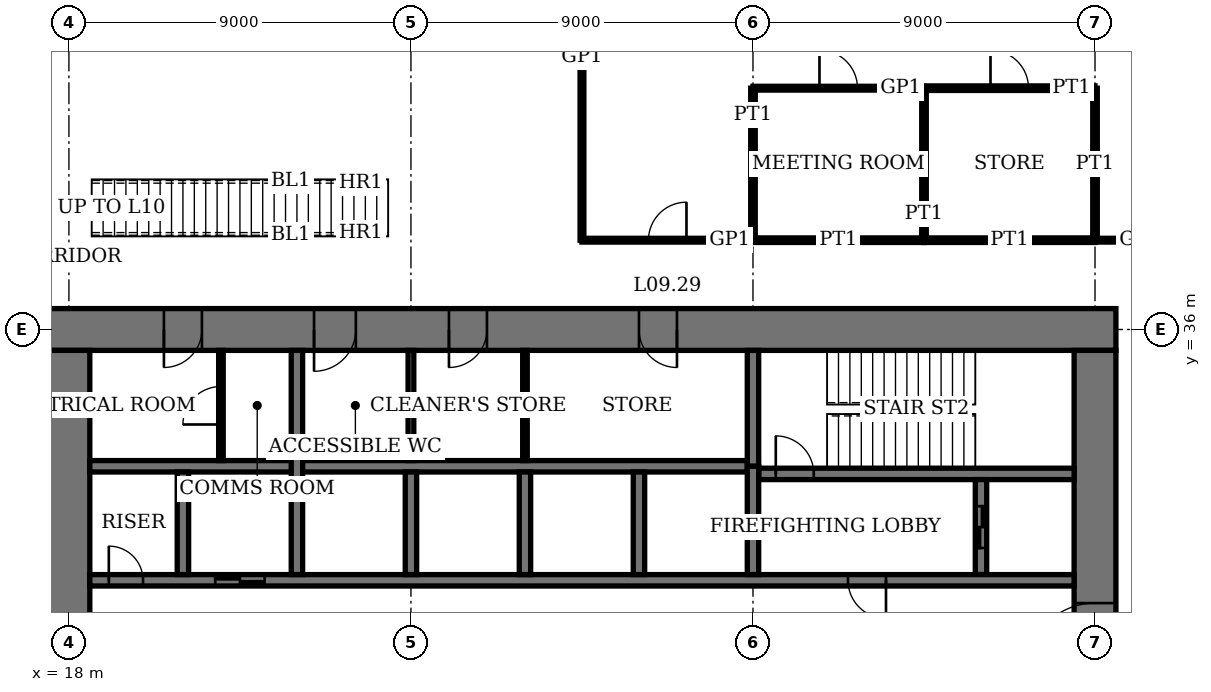
"""IFC4 building model, lengths in metres.
Left out: names, types, materials, properties, quantities, classifications, styles, units other than length and angle.
Written with IfcOpenShell. Run it as: python <this file> out.ifc"""

import sys

from ifc_helpers import new_model, si_unit, direction, frame, frame_2d, origin, place, context, subcontext, project, spatial, rectangle, extrude, element, fill, save


model = new_model("IFC4")
c1 = context("Model", 3, precision=1e-05, world=origin(), true_north=direction((0.0, 1.0)))
c2 = subcontext(c1, "Body", "Model", "MODEL_VIEW")
j1 = project(units=[si_unit("LENGTHUNIT", "METRE"), si_unit("PLANEANGLEUNIT", "RADIAN")], contexts=[c1])
p1 = place(None, origin())
s1 = spatial("IfcSite", under=j1, at=p1, CompositionType="ELEMENT")
p2 = place(p1, origin())
s2 = spatial("IfcBuilding", under=s1, at=p2, CompositionType="ELEMENT")
p3 = place(p2, frame((0.0, 0.0, 39.8)))
s3 = spatial("IfcBuildingStorey", under=s2, at=p3, CompositionType="ELEMENT", Elevation=39.8)
p4 = place(p3, frame((45.55, 36.0, 0.0), z_axis=(0.0, 0.0, 1.0), x_axis=(-1.0, 0.0, 0.0)))
e1 = element("IfcWall", 1, at=p4, inside=s3, PredefinedType="SHEAR", context=c2, shape_type="SweptSolid", body=[
    extrude(rectangle(XDim=28.1, YDim=1.1, at=frame_2d((14.05, 0.0))), origin(), (0.0, 0.0, 1.0), 4.0),
])
p5 = place(p4, frame((11.55, 0.0, 0.0)))
e2 = element("IfcOpeningElement", 2, at=p5, cuts=e1, PredefinedType="OPENING", context=c2, shape_type="SweptSolid", body=[
    extrude(rectangle(XDim=1.0, YDim=2.4, at=frame_2d((0.5, 1.2))), frame((0.0, 0.56, 0.0), z_axis=(0.0, -1.0, 0.0), x_axis=(1.0, 0.0, 0.0)), (0.0, 0.0, 1.0), 1.12),
])
p6 = place(p4, frame((16.55, 0.0, 0.0)))
e3 = element("IfcOpeningElement", 3, at=p6, cuts=e1, PredefinedType="OPENING", context=c2, shape_type="SweptSolid", body=[
    extrude(rectangle(XDim=1.0, YDim=2.4, at=frame_2d((0.5, 1.2))), frame((0.0, 0.56, 0.0), z_axis=(0.0, -1.0, 0.0), x_axis=(1.0, 0.0, 0.0)), (0.0, 0.0, 1.0), 1.12),
])
p7 = place(p4, frame((20.0, 0.0, 0.0)))
e4 = element("IfcOpeningElement", 4, at=p7, cuts=e1, PredefinedType="OPENING", context=c2, shape_type="SweptSolid", body=[
    extrude(rectangle(XDim=1.1, YDim=2.4, at=frame_2d((0.55, 1.2))), frame((0.0, 0.56, 0.0), z_axis=(0.0, -1.0, 0.0), x_axis=(1.0, 0.0, 0.0)), (0.0, 0.0, 1.0), 1.12),
])
p8 = place(p4, frame((24.05, 0.0, 0.0)))
e5 = element("IfcOpeningElement", 5, at=p8, cuts=e1, PredefinedType="OPENING", context=c2, shape_type="SweptSolid", body=[
    extrude(rectangle(XDim=1.0, YDim=2.4, at=frame_2d((0.5, 1.2))), frame((0.0, 0.56, 0.0), z_axis=(0.0, -1.0, 0.0), x_axis=(1.0, 0.0, 0.0)), (0.0, 0.0, 1.0), 1.12),
])
p9 = place(p3, frame((18.0, 35.45, 0.0), z_axis=(0.0, 0.0, 1.0), x_axis=(0.0, -1.0, 0.0)))
e6 = element("IfcWall", 6, at=p9, inside=s3, PredefinedType="SHEAR", context=c2, shape_type="SweptSolid", body=[
    extrude(rectangle(XDim=16.9, YDim=1.1, at=frame_2d((8.45, 0.0))), origin(), (0.0, 0.0, 1.0), 4.0),
])
p10 = place(p9, frame((8.45, 0.0, 0.0)))
e7 = element("IfcOpeningElement", 7, at=p10, cuts=e6, PredefinedType="OPENING", context=c2, shape_type="SweptSolid", body=[
    extrude(rectangle(XDim=1.8, YDim=2.4, at=frame_2d((0.9, 1.2))), frame((0.0, 0.56, 0.0), z_axis=(0.0, -1.0, 0.0), x_axis=(1.0, 0.0, 0.0)), (0.0, 0.0, 1.0), 1.12),
])
p11 = place(p3, frame((45.0, 18.55, 0.0), z_axis=(0.0, 0.0, 1.0), x_axis=(0.0, 1.0, 0.0)))
e8 = element("IfcWall", 8, at=p11, inside=s3, PredefinedType="SHEAR", context=c2, shape_type="SweptSolid", body=[
    extrude(rectangle(XDim=16.9, YDim=1.1, at=frame_2d((8.45, 0.0))), origin(), (0.0, 0.0, 1.0), 4.0),
])
p12 = place(p11, frame((8.45, 0.0, 0.0)))
e9 = element("IfcOpeningElement", 9, at=p12, cuts=e8, PredefinedType="OPENING", context=c2, shape_type="SweptSolid", body=[
    extrude(rectangle(XDim=1.8, YDim=2.4, at=frame_2d((0.9, 1.2))), frame((0.0, 0.56, 0.0), z_axis=(0.0, -1.0, 0.0), x_axis=(1.0, 0.0, 0.0)), (0.0, 0.0, 1.0), 1.12),
])
p13 = place(p3, frame((36.15, 32.2, 0.0), z_axis=(0.0, 0.0, 1.0), x_axis=(1.0, 0.0, 0.0)))
e10 = element("IfcWall", 10, at=p13, inside=s3, PredefinedType="SHEAR", context=c2, shape_type="SweptSolid", body=[
    extrude(rectangle(XDim=8.3, YDim=0.3, at=frame_2d((4.15, 0.0))), origin(), (0.0, 0.0, 1.0), 4.0),
])
p14 = place(p13, frame((0.45, 0.0, 0.0)))
e11 = element("IfcOpeningElement", 11, at=p14, cuts=e10, PredefinedType="OPENING", context=c2, shape_type="SweptSolid", body=[
    extrude(rectangle(XDim=1.0, YDim=2.4, at=frame_2d((0.5, 1.2))), frame((0.0, 0.16, 0.0), z_axis=(0.0, -1.0, 0.0), x_axis=(1.0, 0.0, 0.0)), (0.0, 0.0, 1.0), 0.32),
])
p15 = place(p3, frame((36.0, 32.4, 0.0), z_axis=(0.0, 0.0, 1.0), x_axis=(0.0, 1.0, 0.0)))
e12 = element("IfcWall", 12, at=p15, inside=s3, PredefinedType="SHEAR", context=c2, shape_type="SweptSolid", body=[
    extrude(rectangle(XDim=3.05, YDim=0.3, at=frame_2d((1.525, 0.0))), origin(), (0.0, 0.0, 1.0), 4.0),
])
p16 = place(p3, frame((42.0, 29.55, 0.0), z_axis=(0.0, 0.0, 1.0), x_axis=(0.0, 1.0, 0.0)))
e13 = element("IfcWall", 13, at=p16, inside=s3, PredefinedType="SHEAR", context=c2, shape_type="SweptSolid", body=[
    extrude(rectangle(XDim=2.5, YDim=0.3, at=frame_2d((1.25, 0.0))), origin(), (0.0, 0.0, 1.0), 4.0),
])
p17 = place(p16, frame((0.7, 0.0, 0.0)))
e14 = element("IfcOpeningElement", 14, at=p17, cuts=e13, PredefinedType="OPENING", context=c2, shape_type="SweptSolid", body=[
    extrude(rectangle(XDim=1.1, YDim=2.4, at=frame_2d((0.55, 1.2))), frame((0.0, 0.16, 0.0), z_axis=(0.0, -1.0, 0.0), x_axis=(1.0, 0.0, 0.0)), (0.0, 0.0, 1.0), 0.32),
])
p18 = place(p3, frame((18.55, 29.4, 0.0), z_axis=(0.0, 0.0, 1.0), x_axis=(1.0, 0.0, 0.0)))
e15 = element("IfcWall", 15, at=p18, inside=s3, PredefinedType="SHEAR", context=c2, shape_type="SweptSolid", body=[
    extrude(rectangle(XDim=25.9, YDim=0.3, at=frame_2d((12.95, 0.0))), origin(), (0.0, 0.0, 1.0), 4.0),
])
p19 = place(p18, frame((19.95, 0.0, 0.0)))
e16 = element("IfcOpeningElement", 16, at=p19, cuts=e15, PredefinedType="OPENING", context=c2, shape_type="SweptSolid", body=[
    extrude(rectangle(XDim=1.0, YDim=2.4, at=frame_2d((0.5, 1.2))), frame((0.0, 0.16, 0.0), z_axis=(0.0, -1.0, 0.0), x_axis=(1.0, 0.0, 0.0)), (0.0, 0.0, 1.0), 0.32),
])
p20 = place(p18, frame((0.5, 0.0, 0.0)))
e17 = element("IfcOpeningElement", 17, at=p20, cuts=e15, PredefinedType="OPENING", context=c2, shape_type="SweptSolid", body=[
    extrude(rectangle(XDim=0.9, YDim=2.1, at=frame_2d((0.45, 1.05))), frame((0.0, 0.16, 0.0), z_axis=(0.0, -1.0, 0.0), x_axis=(1.0, 0.0, 0.0)), (0.0, 0.0, 1.0), 0.32),
])
p21 = place(p18, frame((3.3, 0.0, 0.0)))
e18 = element("IfcOpeningElement", 18, at=p21, cuts=e15, PredefinedType="OPENING", context=c2, shape_type="SweptSolid", body=[
    extrude(rectangle(XDim=1.3, YDim=2.4, at=frame_2d((0.65, 1.2))), frame((0.0, 0.16, 0.0), z_axis=(0.0, -1.0, 0.0), x_axis=(1.0, 0.0, 0.0)), (0.0, 0.0, 1.0), 0.32),
])
p22 = place(p3, frame((18.55, 32.4, 0.0), z_axis=(0.0, 0.0, 1.0), x_axis=(1.0, 0.0, 0.0)))
e19 = element("IfcWall", 19, at=p22, inside=s3, PredefinedType="SHEAR", context=c2, shape_type="SweptSolid", body=[
    extrude(rectangle(XDim=17.3, YDim=0.3, at=frame_2d((8.65, 0.0))), origin(), (0.0, 0.0, 1.0), 4.0),
])
for number, where, z_axis, x_axis in (
    (20, (33.0, 29.55, 0.0), (0.0, 0.0, 1.0), (0.0, 1.0, 0.0)),
    (21, (30.0, 29.55, 0.0), (0.0, 0.0, 1.0), (0.0, 1.0, 0.0)),
    (22, (27.0, 29.55, 0.0), (0.0, 0.0, 1.0), (0.0, 1.0, 0.0)),
):
    element("IfcWall", number, at=place(p3, frame(where, z_axis=z_axis, x_axis=x_axis)), inside=s3, PredefinedType="SHEAR", context=c2, shape_type="SweptSolid", body=[
        extrude(rectangle(XDim=2.7, YDim=0.3, at=frame_2d((1.35, 0.0))), origin(), (0.0, 0.0, 1.0), 4.0),
    ])
p23 = place(p3, frame((24.0, 29.55, 0.0), z_axis=(0.0, 0.0, 1.0), x_axis=(0.0, 1.0, 0.0)))
e23 = element("IfcWall", 23, at=p23, inside=s3, PredefinedType="SHEAR", context=c2, shape_type="SweptSolid", body=[
    extrude(rectangle(XDim=5.9, YDim=0.3, at=frame_2d((2.95, 0.0))), origin(), (0.0, 0.0, 1.0), 4.0),
])
p24 = place(p3, frame((21.0, 29.55, 0.0), z_axis=(0.0, 0.0, 1.0), x_axis=(0.0, 1.0, 0.0)))
e24 = element("IfcWall", 24, at=p24, inside=s3, PredefinedType="SHEAR", context=c2, shape_type="SweptSolid", body=[
    extrude(rectangle(XDim=2.7, YDim=0.3, at=frame_2d((1.35, 0.0))), origin(), (0.0, 0.0, 1.0), 4.0),
])
p25 = place(p3, frame((36.0, 29.55, 0.0), z_axis=(0.0, 0.0, 1.0), x_axis=(0.0, 1.0, 0.0)))
e25 = element("IfcWall", 25, at=p25, inside=s3, PredefinedType="SHEAR", context=c2, shape_type="SweptSolid", body=[
    extrude(rectangle(XDim=2.85, YDim=0.3, at=frame_2d((1.425, 0.0))), origin(), (0.0, 0.0, 1.0), 4.0),
])
for number, where, z_axis, x_axis in (
    (26, (36.0, 38.35, 0.0), (0.0, 0.0, 1.0), (1.0, 0.0, 0.0)),
    (27, (40.5, 38.35, 0.0), (0.0, 0.0, 1.0), (1.0, 0.0, 0.0)),
):
    element("IfcWall", number, at=place(p3, frame(where, z_axis=z_axis, x_axis=x_axis)), inside=s3, PredefinedType="PARTITIONING", context=c2, shape_type="SweptSolid", body=[
        extrude(rectangle(XDim=4.5, YDim=0.12, at=frame_2d((2.25, 0.0))), origin(), (0.0, 0.0, 1.0), 3.75),
    ])
p26 = place(p3, frame((31.5, 38.35, 0.0), z_axis=(0.0, 0.0, 1.0), x_axis=(1.0, 0.0, 0.0)))
e28 = element("IfcWall", 28, at=p26, inside=s3, PredefinedType="PARTITIONING", context=c2, shape_type="SweptSolid", body=[
    extrude(rectangle(XDim=4.5, YDim=0.1, at=frame_2d((2.25, 0.0))), origin(), (0.0, 0.0, 1.0), 3.75),
])
p27 = place(p26, frame((1.75, 0.0, 0.0)))
e29 = element("IfcOpeningElement", 29, at=p27, cuts=e28, PredefinedType="OPENING", context=c2, shape_type="SweptSolid", body=[
    extrude(rectangle(XDim=1.0, YDim=2.4, at=frame_2d((0.5, 1.2))), frame((0.0, 0.06, 0.0), z_axis=(0.0, -1.0, 0.0), x_axis=(1.0, 0.0, 0.0)), (0.0, 0.0, 1.0), 0.12),
])
p28 = place(p3, frame((45.0, 38.35, 0.0), z_axis=(0.0, 0.0, 1.0), x_axis=(1.0, 0.0, 0.0)))
e30 = element("IfcWall", 30, at=p28, inside=s3, PredefinedType="PARTITIONING", context=c2, shape_type="SweptSolid", body=[
    extrude(rectangle(XDim=2.35, YDim=0.1, at=frame_2d((1.175, 0.0))), origin(), (0.0, 0.0, 1.0), 3.75),
])
p29 = place(p3, frame((40.5, 42.35, 0.0), z_axis=(0.0, 0.0, 1.0), x_axis=(1.0, 0.0, 0.0)))
e31 = element("IfcWall", 31, at=p29, inside=s3, PredefinedType="PARTITIONING", context=c2, shape_type="SweptSolid", body=[
    extrude(rectangle(XDim=4.5, YDim=0.12, at=frame_2d((2.25, 0.0))), origin(), (0.0, 0.0, 1.0), 3.75),
])
p30 = place(p29, frame((1.75, 0.0, 0.0)))
e32 = element("IfcOpeningElement", 32, at=p30, cuts=e31, PredefinedType="OPENING", context=c2, shape_type="SweptSolid", body=[
    extrude(rectangle(XDim=1.0, YDim=2.4, at=frame_2d((0.5, 1.2))), frame((0.0, 0.07, 0.0), z_axis=(0.0, -1.0, 0.0), x_axis=(1.0, 0.0, 0.0)), (0.0, 0.0, 1.0), 0.14),
])
p31 = place(p3, frame((36.0, 42.35, 0.0), z_axis=(0.0, 0.0, 1.0), x_axis=(1.0, 0.0, 0.0)))
e33 = element("IfcWall", 33, at=p31, inside=s3, PredefinedType="PARTITIONING", context=c2, shape_type="SweptSolid", body=[
    extrude(rectangle(XDim=4.5, YDim=0.1, at=frame_2d((2.25, 0.0))), origin(), (0.0, 0.0, 1.0), 3.75),
])
p32 = place(p31, frame((1.75, 0.0, 0.0)))
e34 = element("IfcOpeningElement", 34, at=p32, cuts=e33, PredefinedType="OPENING", context=c2, shape_type="SweptSolid", body=[
    extrude(rectangle(XDim=1.0, YDim=2.4, at=frame_2d((0.5, 1.2))), frame((0.0, 0.06, 0.0), z_axis=(0.0, -1.0, 0.0), x_axis=(1.0, 0.0, 0.0)), (0.0, 0.0, 1.0), 0.12),
])
p33 = place(p3, frame((31.5, 38.35, 0.0), z_axis=(0.0, 0.0, 1.0), x_axis=(0.0, 1.0, 0.0)))
e35 = element("IfcWall", 35, at=p33, inside=s3, PredefinedType="PARTITIONING", context=c2, shape_type="SweptSolid", body=[
    extrude(rectangle(XDim=10.26, YDim=0.1, at=frame_2d((5.13, 0.0))), origin(), (0.0, 0.0, 1.0), 3.75),
])
p34 = place(p3, frame((36.0, 38.35, 0.0), z_axis=(0.0, 0.0, 1.0), x_axis=(0.0, 1.0, 0.0)))
e36 = element("IfcWall", 36, at=p34, inside=s3, PredefinedType="PARTITIONING", context=c2, shape_type="SweptSolid", body=[
    extrude(rectangle(XDim=4.0, YDim=0.12, at=frame_2d((2.0, 0.0))), origin(), (0.0, 0.0, 1.0), 3.05),
])
p35 = place(p3, frame((40.5, 38.35, 0.0), z_axis=(0.0, 0.0, 1.0), x_axis=(0.0, 1.0, 0.0)))
e37 = element("IfcWall", 37, at=p35, inside=s3, PredefinedType="PARTITIONING", context=c2, shape_type="SweptSolid", body=[
    extrude(rectangle(XDim=4.0, YDim=0.12, at=frame_2d((2.0, 0.0))), origin(), (0.0, 0.0, 1.0), 3.75),
])
p36 = place(p3, frame((45.0, 38.35, 0.0), z_axis=(0.0, 0.0, 1.0), x_axis=(0.0, 1.0, 0.0)))
e38 = element("IfcWall", 38, at=p36, inside=s3, PredefinedType="PARTITIONING", context=c2, shape_type="SweptSolid", body=[
    extrude(rectangle(XDim=4.0, YDim=0.12, at=frame_2d((2.0, 0.0))), origin(), (0.0, 0.0, 1.0), 3.05),
])
p37 = place(p3, frame((30.0, 32.55, 0.0), z_axis=(0.0, 0.0, 1.0), x_axis=(0.0, 1.0, 0.0)))
e39 = element("IfcWall", 39, at=p37, inside=s3, PredefinedType="PARTITIONING", context=c2, shape_type="SweptSolid", body=[
    extrude(rectangle(XDim=2.9, YDim=0.12, at=frame_2d((1.45, 0.0))), origin(), (0.0, 0.0, 1.0), 3.75),
])
p38 = place(p3, frame((27.0, 32.55, 0.0), z_axis=(0.0, 0.0, 1.0), x_axis=(0.0, 1.0, 0.0)))
e40 = element("IfcWall", 40, at=p38, inside=s3, PredefinedType="PARTITIONING", context=c2, shape_type="SweptSolid", body=[
    extrude(rectangle(XDim=2.9, YDim=0.15, at=frame_2d((1.45, 0.0))), origin(), (0.0, 0.0, 1.0), 3.75),
])
p39 = place(p3, frame((22.0, 32.55, 0.0), z_axis=(0.0, 0.0, 1.0), x_axis=(0.0, 1.0, 0.0)))
e41 = element("IfcWall", 41, at=p39, inside=s3, PredefinedType="PARTITIONING", context=c2, shape_type="SweptSolid", body=[
    extrude(rectangle(XDim=2.9, YDim=0.12, at=frame_2d((1.45, 0.0))), origin(), (0.0, 0.0, 1.0), 3.75),
])
p40 = place(p39, frame((0.95, 0.0, 0.0)))
e42 = element("IfcOpeningElement", 42, at=p40, cuts=e41, PredefinedType="OPENING", context=c2, shape_type="SweptSolid", body=[
    extrude(rectangle(XDim=1.0, YDim=2.4, at=frame_2d((0.5, 1.2))), frame((0.0, 0.07, 0.0), z_axis=(0.0, -1.0, 0.0), x_axis=(1.0, 0.0, 0.0)), (0.0, 0.0, 1.0), 0.14),
])
p41 = place(p12, origin())
e43 = element("IfcDoor", 43, at=p41, inside=s3, OperationType="DOUBLE_DOOR_DOUBLE_SWING", PredefinedType="DOOR", context=c2, shape_type="SweptSolid", body=[
    extrude(rectangle(XDim=1.8, YDim=2.4, at=frame_2d((0.9, 1.2))), frame((0.0, 0.03, 0.0), z_axis=(0.0, -1.0, 0.0), x_axis=(1.0, 0.0, 0.0)), (0.0, 0.0, 1.0), 0.06),
    extrude(rectangle(XDim=0.04, YDim=2.4, at=frame_2d((0.02, 1.2))), frame((0.0, 0.55, 0.0), z_axis=(0.0, -1.0, 0.0), x_axis=(1.0, 0.0, 0.0)), (0.0, 0.0, 1.0), 1.1),
    extrude(rectangle(XDim=0.04, YDim=2.4, at=frame_2d((1.78, 1.2))), frame((0.0, 0.55, 0.0), z_axis=(0.0, -1.0, 0.0), x_axis=(1.0, 0.0, 0.0)), (0.0, 0.0, 1.0), 1.1),
    extrude(rectangle(XDim=1.8, YDim=0.04, at=frame_2d((0.9, 2.38))), frame((0.0, 0.55, 0.0), z_axis=(0.0, -1.0, 0.0), x_axis=(1.0, 0.0, 0.0)), (0.0, 0.0, 1.0), 1.1),
])
fill(e9, e43)
p42 = place(p5, origin())
e44 = element("IfcDoor", 44, at=p42, inside=s3, OperationType="SINGLE_SWING_RIGHT", PredefinedType="DOOR", context=c2, shape_type="SweptSolid", body=[
    extrude(rectangle(XDim=1.0, YDim=2.4, at=frame_2d((0.5, 1.2))), frame((0.0, 0.025, 0.0), z_axis=(0.0, -1.0, 0.0), x_axis=(1.0, 0.0, 0.0)), (0.0, 0.0, 1.0), 0.05),
    extrude(rectangle(XDim=0.04, YDim=2.4, at=frame_2d((0.02, 1.2))), frame((0.0, 0.4, 0.0), z_axis=(0.0, -1.0, 0.0), x_axis=(1.0, 0.0, 0.0)), (0.0, 0.0, 1.0), 0.8),
    extrude(rectangle(XDim=0.04, YDim=2.4, at=frame_2d((0.98, 1.2))), frame((0.0, 0.4, 0.0), z_axis=(0.0, -1.0, 0.0), x_axis=(1.0, 0.0, 0.0)), (0.0, 0.0, 1.0), 0.8),
    extrude(rectangle(XDim=1.0, YDim=0.04, at=frame_2d((0.5, 2.38))), frame((0.0, 0.4, 0.0), z_axis=(0.0, -1.0, 0.0), x_axis=(1.0, 0.0, 0.0)), (0.0, 0.0, 1.0), 0.8),
])
fill(e2, e44)
p43 = place(p6, origin())
e45 = element("IfcDoor", 45, at=p43, inside=s3, OperationType="SINGLE_SWING_LEFT", PredefinedType="DOOR", context=c2, shape_type="SweptSolid", body=[
    extrude(rectangle(XDim=1.0, YDim=2.4, at=frame_2d((0.5, 1.2))), frame((0.0, 0.025, 0.0), z_axis=(0.0, -1.0, 0.0), x_axis=(1.0, 0.0, 0.0)), (0.0, 0.0, 1.0), 0.05),
    extrude(rectangle(XDim=0.04, YDim=2.4, at=frame_2d((0.02, 1.2))), frame((0.0, 0.4, 0.0), z_axis=(0.0, -1.0, 0.0), x_axis=(1.0, 0.0, 0.0)), (0.0, 0.0, 1.0), 0.8),
    extrude(rectangle(XDim=0.04, YDim=2.4, at=frame_2d((0.98, 1.2))), frame((0.0, 0.4, 0.0), z_axis=(0.0, -1.0, 0.0), x_axis=(1.0, 0.0, 0.0)), (0.0, 0.0, 1.0), 0.8),
    extrude(rectangle(XDim=1.0, YDim=0.04, at=frame_2d((0.5, 2.38))), frame((0.0, 0.4, 0.0), z_axis=(0.0, -1.0, 0.0), x_axis=(1.0, 0.0, 0.0)), (0.0, 0.0, 1.0), 0.8),
])
fill(e3, e45)
p44 = place(p7, origin())
e46 = element("IfcDoor", 46, at=p44, inside=s3, OperationType="SINGLE_SWING_LEFT", PredefinedType="DOOR", context=c2, shape_type="SweptSolid", body=[
    extrude(rectangle(XDim=1.1, YDim=2.4, at=frame_2d((0.55, 1.2))), frame((0.0, 0.025, 0.0), z_axis=(0.0, -1.0, 0.0), x_axis=(1.0, 0.0, 0.0)), (0.0, 0.0, 1.0), 0.05),
    extrude(rectangle(XDim=0.04, YDim=2.4, at=frame_2d((0.02, 1.2))), frame((0.0, 0.44, 0.0), z_axis=(0.0, -1.0, 0.0), x_axis=(1.0, 0.0, 0.0)), (0.0, 0.0, 1.0), 0.88),
    extrude(rectangle(XDim=0.04, YDim=2.4, at=frame_2d((1.08, 1.2))), frame((0.0, 0.44, 0.0), z_axis=(0.0, -1.0, 0.0), x_axis=(1.0, 0.0, 0.0)), (0.0, 0.0, 1.0), 0.88),
    extrude(rectangle(XDim=1.1, YDim=0.04, at=frame_2d((0.55, 2.38))), frame((0.0, 0.44, 0.0), z_axis=(0.0, -1.0, 0.0), x_axis=(1.0, 0.0, 0.0)), (0.0, 0.0, 1.0), 0.88),
])
fill(e4, e46)
p45 = place(p8, origin())
e47 = element("IfcDoor", 47, at=p45, inside=s3, OperationType="SINGLE_SWING_LEFT", PredefinedType="DOOR", context=c2, shape_type="SweptSolid", body=[
    extrude(rectangle(XDim=1.0, YDim=2.4, at=frame_2d((0.5, 1.2))), frame((0.0, 0.025, 0.0), z_axis=(0.0, -1.0, 0.0), x_axis=(1.0, 0.0, 0.0)), (0.0, 0.0, 1.0), 0.05),
    extrude(rectangle(XDim=0.04, YDim=2.4, at=frame_2d((0.02, 1.2))), frame((0.0, 0.4, 0.0), z_axis=(0.0, -1.0, 0.0), x_axis=(1.0, 0.0, 0.0)), (0.0, 0.0, 1.0), 0.8),
    extrude(rectangle(XDim=0.04, YDim=2.4, at=frame_2d((0.98, 1.2))), frame((0.0, 0.4, 0.0), z_axis=(0.0, -1.0, 0.0), x_axis=(1.0, 0.0, 0.0)), (0.0, 0.0, 1.0), 0.8),
    extrude(rectangle(XDim=1.0, YDim=0.04, at=frame_2d((0.5, 2.38))), frame((0.0, 0.4, 0.0), z_axis=(0.0, -1.0, 0.0), x_axis=(1.0, 0.0, 0.0)), (0.0, 0.0, 1.0), 0.8),
])
fill(e5, e47)
p46 = place(p14, origin())
e48 = element("IfcDoor", 48, at=p46, inside=s3, OperationType="SINGLE_SWING_RIGHT", PredefinedType="DOOR", context=c2, shape_type="SweptSolid", body=[
    extrude(rectangle(XDim=1.0, YDim=2.4, at=frame_2d((0.5, 1.2))), frame((0.0, 0.03, 0.0), z_axis=(0.0, -1.0, 0.0), x_axis=(1.0, 0.0, 0.0)), (0.0, 0.0, 1.0), 0.06),
])
fill(e11, e48)
p47 = place(p19, origin())
e49 = element("IfcDoor", 49, at=p47, inside=s3, OperationType="SINGLE_SWING_RIGHT", PredefinedType="DOOR", context=c2, shape_type="SweptSolid", body=[
    extrude(rectangle(XDim=1.0, YDim=2.4, at=frame_2d((0.5, 1.2))), frame((0.0, 0.03, 0.0), z_axis=(0.0, -1.0, 0.0), x_axis=(1.0, 0.0, 0.0)), (0.0, 0.0, 1.0), 0.06),
])
fill(e16, e49)
p48 = place(p20, origin())
e50 = element("IfcDoor", 50, at=p48, inside=s3, OperationType="SINGLE_SWING_RIGHT", PredefinedType="DOOR", context=c2, shape_type="SweptSolid", body=[
    extrude(rectangle(XDim=0.9, YDim=2.1, at=frame_2d((0.45, 1.05))), frame((0.0, 0.03, 0.0), z_axis=(0.0, -1.0, 0.0), x_axis=(1.0, 0.0, 0.0)), (0.0, 0.0, 1.0), 0.06),
])
fill(e17, e50)
p49 = place(p27, origin())
e51 = element("IfcDoor", 51, at=p49, inside=s3, OperationType="SINGLE_SWING_LEFT", PredefinedType="DOOR", context=c2, shape_type="SweptSolid", body=[
    extrude(rectangle(XDim=1.0, YDim=2.4, at=frame_2d((0.5, 1.2))), frame((0.0, 0.02, 0.0), z_axis=(0.0, -1.0, 0.0), x_axis=(1.0, 0.0, 0.0)), (0.0, 0.0, 1.0), 0.04),
])
fill(e29, e51)
p50 = place(p30, origin())
e52 = element("IfcDoor", 52, at=p50, inside=s3, OperationType="SINGLE_SWING_RIGHT", PredefinedType="DOOR", context=c2, shape_type="SweptSolid", body=[
    extrude(rectangle(XDim=1.0, YDim=2.4, at=frame_2d((0.5, 1.2))), frame((0.0, 0.025, 0.0), z_axis=(0.0, -1.0, 0.0), x_axis=(1.0, 0.0, 0.0)), (0.0, 0.0, 1.0), 0.05),
])
fill(e32, e52)
p51 = place(p32, origin())
e53 = element("IfcDoor", 53, at=p51, inside=s3, OperationType="SINGLE_SWING_RIGHT", PredefinedType="DOOR", context=c2, shape_type="SweptSolid", body=[
    extrude(rectangle(XDim=1.0, YDim=2.4, at=frame_2d((0.5, 1.2))), frame((0.0, 0.02, 0.0), z_axis=(0.0, -1.0, 0.0), x_axis=(1.0, 0.0, 0.0)), (0.0, 0.0, 1.0), 0.04),
])
fill(e34, e53)
p52 = place(p40, origin())
e54 = element("IfcDoor", 54, at=p52, inside=s3, OperationType="SINGLE_SWING_RIGHT", PredefinedType="DOOR", context=c2, shape_type="SweptSolid", body=[
    extrude(rectangle(XDim=1.0, YDim=2.4, at=frame_2d((0.5, 1.2))), frame((0.0, 0.03, 0.0), z_axis=(0.0, -1.0, 0.0), x_axis=(1.0, 0.0, 0.0)), (0.0, 0.0, 1.0), 0.06),
])
fill(e42, e54)
p53 = place(p21, origin())
e55 = element("IfcDoor", 55, at=p53, inside=s3, OperationType="DOUBLE_DOOR_SLIDING", PredefinedType="DOOR", context=c2, shape_type="SweptSolid", body=[
    extrude(rectangle(XDim=1.3, YDim=2.4, at=frame_2d((0.65, 1.2))), frame((0.0, 0.02, 0.0), z_axis=(0.0, -1.0, 0.0), x_axis=(1.0, 0.0, 0.0)), (0.0, 0.0, 1.0), 0.04),
])
fill(e18, e55)
p54 = place(p17, origin())
e56 = element("IfcDoor", 56, at=p54, inside=s3, OperationType="DOUBLE_DOOR_SLIDING", PredefinedType="DOOR", context=c2, shape_type="SweptSolid", body=[
    extrude(rectangle(XDim=1.1, YDim=2.4, at=frame_2d((0.55, 1.2))), frame((0.0, 0.03, 0.0), z_axis=(0.0, -1.0, 0.0), x_axis=(1.0, 0.0, 0.0)), (0.0, 0.0, 1.0), 0.06),
])
fill(e14, e56)
save(model, sys.argv[1])
